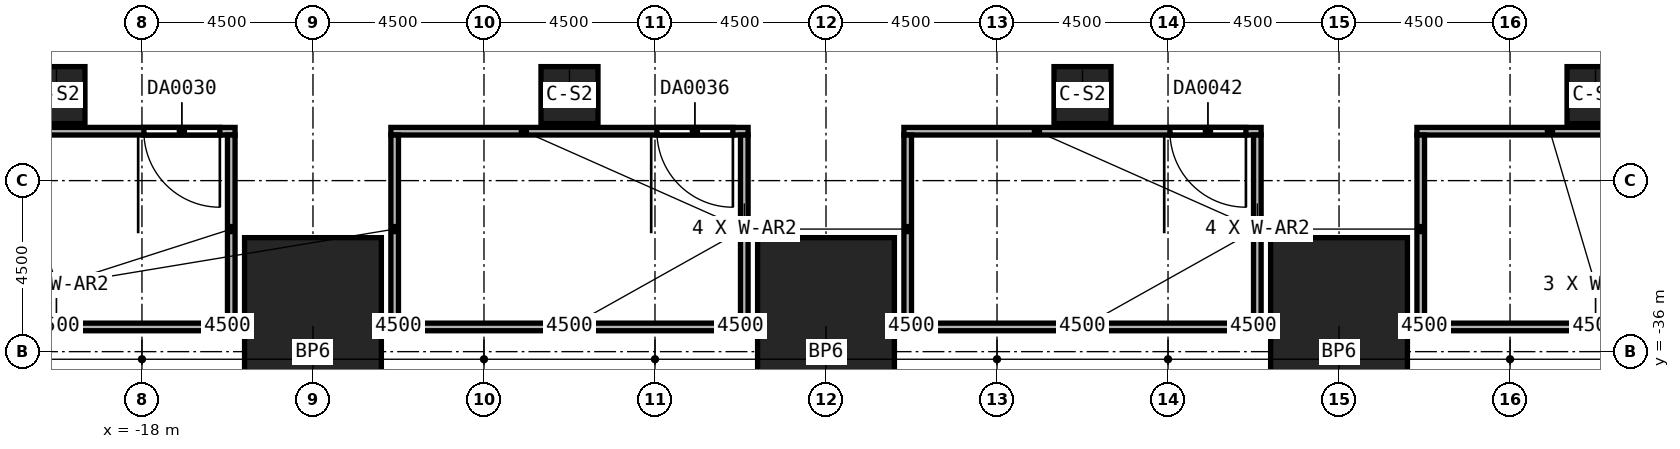
"""IFC4 building model, lengths in metres.
Left out: names, types, materials, properties, quantities, classifications, styles, units other than length and angle.
Written with IfcOpenShell. Run it as: python <this file> out.ifc"""

import sys

from ifc_helpers import new_model, si_unit, direction, frame, frame_2d, origin, origin_2d, place, context, subcontext, project, spatial, rectangle, extrude, element, fill, save


model = new_model("IFC4")
c1 = context("Model", 3, precision=1e-05, world=origin(), true_north=direction((0.0, 1.0)))
c2 = subcontext(c1, "Body", "Model", "MODEL_VIEW")
j1 = project(units=[si_unit("LENGTHUNIT", "METRE"), si_unit("PLANEANGLEUNIT", "RADIAN")], contexts=[c1])
p1 = place(None, origin())
s1 = spatial("IfcSite", under=j1, at=p1, CompositionType="ELEMENT")
p2 = place(p1, origin())
s2 = spatial("IfcBuilding", under=s1, at=p2, CompositionType="ELEMENT")
p3 = place(p2, frame((0.0, 0.0, 37.0)))
s3 = spatial("IfcBuildingStorey", under=s2, at=p3, CompositionType="ELEMENT", Elevation=37.0)
for number, where, z_axis, x_axis in (
    (1, (-13.5, -36.0, 0.0), (0.0, 0.0, 1.0), (1.0, 0.0, 0.0)),
    (2, (0.0, -36.0, 0.0), (0.0, 0.0, 1.0), (1.0, 0.0, 0.0)),
    (3, (13.5, -36.0, 0.0), (0.0, 0.0, 1.0), (1.0, 0.0, 0.0)),
):
    element("IfcColumn", number, at=place(p3, frame(where, z_axis=z_axis, x_axis=x_axis)), inside=s3, PredefinedType="COLUMN", context=c2, shape_type="SweptSolid", body=[
        extrude(rectangle(XDim=3.6, YDim=6.0, at=origin_2d()), origin(), (0.0, 0.0, 1.0), 5.8),
    ])
for number, where, z_axis, x_axis in (
    (4, (-20.25, -29.25, 0.0), (0.0, 0.0, 1.0), (1.0, 0.0, 0.0)),
    (5, (-6.75, -29.25, 0.0), (0.0, 0.0, 1.0), (1.0, 0.0, 0.0)),
    (6, (6.75, -29.25, 0.0), (0.0, 0.0, 1.0), (1.0, 0.0, 0.0)),
    (7, (20.25, -29.25, 0.0), (0.0, 0.0, 1.0), (1.0, 0.0, 0.0)),
):
    element("IfcColumn", number, at=place(p3, frame(where, z_axis=z_axis, x_axis=x_axis)), inside=s3, PredefinedType="COLUMN", context=c2, shape_type="SweptSolid", body=[
        extrude(rectangle(XDim=1.5, YDim=1.5, at=origin_2d()), origin(), (0.0, 0.0, 1.0), 7.0),
    ])
p4 = place(p3, frame((-15.55, -30.2, 0.0), z_axis=(0.0, 0.0, 1.0), x_axis=(-1.0, 0.0, 0.0)))
e8 = element("IfcWall", 8, at=p4, inside=s3, PredefinedType="SOLIDWALL", context=c2, shape_type="SweptSolid", body=[
    extrude(rectangle(XDim=9.4, YDim=0.2, at=frame_2d((4.7, 0.0))), origin(), (0.0, 0.0, 1.0), 7.0),
])
p5 = place(p4, frame((0.4, 0.0, 0.0)))
e9 = element("IfcOpeningElement", 9, at=p5, cuts=e8, PredefinedType="OPENING", context=c2, shape_type="SweptSolid", body=[
    extrude(rectangle(XDim=2.0, YDim=2.4, at=frame_2d((1.0, 1.2))), frame((0.0, 0.1, 0.0), z_axis=(0.0, -1.0, 0.0), x_axis=(1.0, 0.0, 0.0)), (0.0, 0.0, 1.0), 0.2),
])
p6 = place(p3, frame((-24.95, -35.35, 0.0), z_axis=(0.0, 0.0, 1.0), x_axis=(1.0, 0.0, 0.0)))
e10 = element("IfcWall", 10, at=p6, inside=s3, PredefinedType="SOLIDWALL", context=c2, shape_type="SweptSolid", body=[
    extrude(rectangle(XDim=9.4, YDim=0.2, at=frame_2d((4.7, 0.0))), origin(), (0.0, 0.0, 1.0), 7.0),
])
p7 = place(p3, frame((-15.65, -35.25, 0.0), z_axis=(0.0, 0.0, 1.0), x_axis=(0.0, 1.0, 0.0)))
e11 = element("IfcWall", 11, at=p7, inside=s3, PredefinedType="SOLIDWALL", context=c2, shape_type="SweptSolid", body=[
    extrude(rectangle(XDim=4.95, YDim=0.2, at=frame_2d((2.475, 0.0))), origin(), (0.0, 0.0, 1.0), 7.0),
])
p8 = place(p3, frame((-2.05, -30.2, 0.0), z_axis=(0.0, 0.0, 1.0), x_axis=(-1.0, 0.0, 0.0)))
e12 = element("IfcWall", 12, at=p8, inside=s3, PredefinedType="SOLIDWALL", context=c2, shape_type="SweptSolid", body=[
    extrude(rectangle(XDim=9.4, YDim=0.2, at=frame_2d((4.7, 0.0))), origin(), (0.0, 0.0, 1.0), 7.0),
])
p9 = place(p8, frame((0.4, 0.0, 0.0)))
e13 = element("IfcOpeningElement", 13, at=p9, cuts=e12, PredefinedType="OPENING", context=c2, shape_type="SweptSolid", body=[
    extrude(rectangle(XDim=2.0, YDim=2.4, at=frame_2d((1.0, 1.2))), frame((0.0, 0.1, 0.0), z_axis=(0.0, -1.0, 0.0), x_axis=(1.0, 0.0, 0.0)), (0.0, 0.0, 1.0), 0.2),
])
p10 = place(p3, frame((-11.45, -35.35, 0.0), z_axis=(0.0, 0.0, 1.0), x_axis=(1.0, 0.0, 0.0)))
e14 = element("IfcWall", 14, at=p10, inside=s3, PredefinedType="SOLIDWALL", context=c2, shape_type="SweptSolid", body=[
    extrude(rectangle(XDim=9.4, YDim=0.2, at=frame_2d((4.7, 0.0))), origin(), (0.0, 0.0, 1.0), 7.0),
])
for number, where, z_axis, x_axis in (
    (15, (-11.35, -35.25, 0.0), (0.0, 0.0, 1.0), (0.0, 1.0, 0.0)),
    (16, (-2.15, -35.25, 0.0), (0.0, 0.0, 1.0), (0.0, 1.0, 0.0)),
):
    element("IfcWall", number, at=place(p3, frame(where, z_axis=z_axis, x_axis=x_axis)), inside=s3, PredefinedType="SOLIDWALL", context=c2, shape_type="SweptSolid", body=[
        extrude(rectangle(XDim=4.95, YDim=0.2, at=frame_2d((2.475, 0.0))), origin(), (0.0, 0.0, 1.0), 7.0),
    ])
p11 = place(p3, frame((11.45, -30.2, 0.0), z_axis=(0.0, 0.0, 1.0), x_axis=(-1.0, 0.0, 0.0)))
e17 = element("IfcWall", 17, at=p11, inside=s3, PredefinedType="SOLIDWALL", context=c2, shape_type="SweptSolid", body=[
    extrude(rectangle(XDim=9.4, YDim=0.2, at=frame_2d((4.7, 0.0))), origin(), (0.0, 0.0, 1.0), 7.0),
])
p12 = place(p11, frame((0.4, 0.0, 0.0)))
e18 = element("IfcOpeningElement", 18, at=p12, cuts=e17, PredefinedType="OPENING", context=c2, shape_type="SweptSolid", body=[
    extrude(rectangle(XDim=2.0, YDim=2.4, at=frame_2d((1.0, 1.2))), frame((0.0, 0.1, 0.0), z_axis=(0.0, -1.0, 0.0), x_axis=(1.0, 0.0, 0.0)), (0.0, 0.0, 1.0), 0.2),
])
p13 = place(p3, frame((2.05, -35.35, 0.0), z_axis=(0.0, 0.0, 1.0), x_axis=(1.0, 0.0, 0.0)))
e19 = element("IfcWall", 19, at=p13, inside=s3, PredefinedType="SOLIDWALL", context=c2, shape_type="SweptSolid", body=[
    extrude(rectangle(XDim=9.4, YDim=0.2, at=frame_2d((4.7, 0.0))), origin(), (0.0, 0.0, 1.0), 7.0),
])
for number, where, z_axis, x_axis in (
    (20, (2.15, -35.25, 0.0), (0.0, 0.0, 1.0), (0.0, 1.0, 0.0)),
    (21, (11.35, -35.25, 0.0), (0.0, 0.0, 1.0), (0.0, 1.0, 0.0)),
):
    element("IfcWall", number, at=place(p3, frame(where, z_axis=z_axis, x_axis=x_axis)), inside=s3, PredefinedType="SOLIDWALL", context=c2, shape_type="SweptSolid", body=[
        extrude(rectangle(XDim=4.95, YDim=0.2, at=frame_2d((2.475, 0.0))), origin(), (0.0, 0.0, 1.0), 7.0),
    ])
p14 = place(p3, frame((24.95, -30.2, 0.0), z_axis=(0.0, 0.0, 1.0), x_axis=(-1.0, 0.0, 0.0)))
e22 = element("IfcWall", 22, at=p14, inside=s3, PredefinedType="SOLIDWALL", context=c2, shape_type="SweptSolid", body=[
    extrude(rectangle(XDim=9.4, YDim=0.2, at=frame_2d((4.7, 0.0))), origin(), (0.0, 0.0, 1.0), 7.0),
])
p15 = place(p14, frame((0.4, 0.0, 0.0)))
e23 = element("IfcOpeningElement", 23, at=p15, cuts=e22, PredefinedType="OPENING", context=c2, shape_type="SweptSolid", body=[
    extrude(rectangle(XDim=2.0, YDim=2.4, at=frame_2d((1.0, 1.2))), frame((0.0, 0.1, 0.0), z_axis=(0.0, -1.0, 0.0), x_axis=(1.0, 0.0, 0.0)), (0.0, 0.0, 1.0), 0.2),
])
p16 = place(p3, frame((15.55, -35.35, 0.0), z_axis=(0.0, 0.0, 1.0), x_axis=(1.0, 0.0, 0.0)))
e24 = element("IfcWall", 24, at=p16, inside=s3, PredefinedType="SOLIDWALL", context=c2, shape_type="SweptSolid", body=[
    extrude(rectangle(XDim=9.4, YDim=0.2, at=frame_2d((4.7, 0.0))), origin(), (0.0, 0.0, 1.0), 7.0),
])
p17 = place(p3, frame((15.65, -35.25, 0.0), z_axis=(0.0, 0.0, 1.0), x_axis=(0.0, 1.0, 0.0)))
e25 = element("IfcWall", 25, at=p17, inside=s3, PredefinedType="SOLIDWALL", context=c2, shape_type="SweptSolid", body=[
    extrude(rectangle(XDim=4.95, YDim=0.2, at=frame_2d((2.475, 0.0))), origin(), (0.0, 0.0, 1.0), 7.0),
])
p18 = place(p5, origin())
e26 = element("IfcDoor", 26, at=p18, inside=s3, OperationType="DOUBLE_DOOR_SINGLE_SWING", PredefinedType="DOOR", context=c2, shape_type="SweptSolid", body=[
    extrude(rectangle(XDim=2.0, YDim=2.4, at=frame_2d((1.0, 1.2))), frame((0.0, 0.025, 0.0), z_axis=(0.0, -1.0, 0.0), x_axis=(1.0, 0.0, 0.0)), (0.0, 0.0, 1.0), 0.05),
])
fill(e9, e26)
p19 = place(p9, origin())
e27 = element("IfcDoor", 27, at=p19, inside=s3, OperationType="DOUBLE_DOOR_SINGLE_SWING", PredefinedType="DOOR", context=c2, shape_type="SweptSolid", body=[
    extrude(rectangle(XDim=2.0, YDim=2.4, at=frame_2d((1.0, 1.2))), frame((0.0, 0.025, 0.0), z_axis=(0.0, -1.0, 0.0), x_axis=(1.0, 0.0, 0.0)), (0.0, 0.0, 1.0), 0.05),
])
fill(e13, e27)
p20 = place(p12, origin())
e28 = element("IfcDoor", 28, at=p20, inside=s3, OperationType="DOUBLE_DOOR_SINGLE_SWING", PredefinedType="DOOR", context=c2, shape_type="SweptSolid", body=[
    extrude(rectangle(XDim=2.0, YDim=2.4, at=frame_2d((1.0, 1.2))), frame((0.0, 0.025, 0.0), z_axis=(0.0, -1.0, 0.0), x_axis=(1.0, 0.0, 0.0)), (0.0, 0.0, 1.0), 0.05),
])
fill(e18, e28)
save(model, sys.argv[1])
